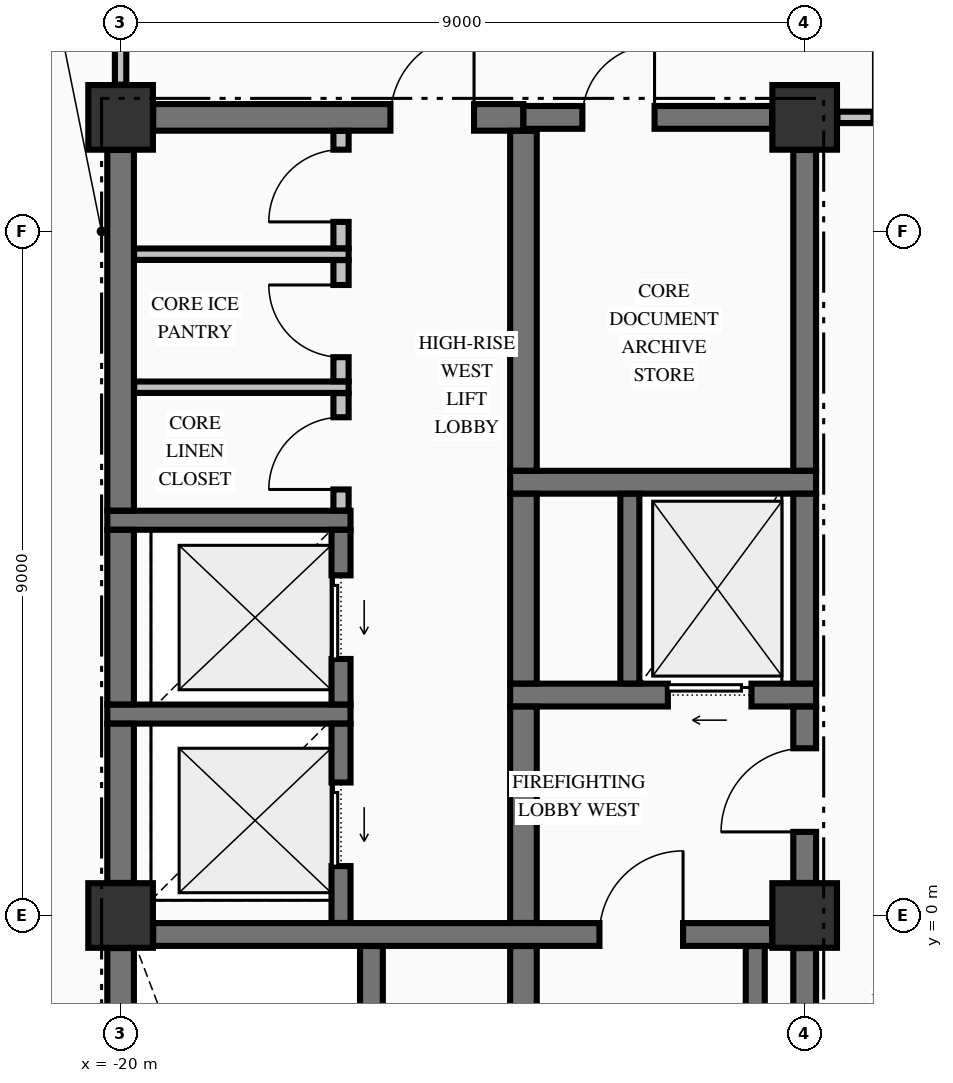
"""IFC4 building model, lengths in metres.
Left out: names, types, materials, properties, quantities, classifications, styles, units other than length and angle.
Written with IfcOpenShell. Run it as: python <this file> out.ifc"""

import sys

from ifc_helpers import new_model, si_unit, direction, frame, frame_2d, origin, origin_2d, place, context, subcontext, project, spatial, rectangle, extrude, element, fill, save


model = new_model("IFC4")
c1 = context("Model", 3, precision=1e-05, world=origin(), true_north=direction((0.0, 1.0)))
c2 = subcontext(c1, "Body", "Model", "MODEL_VIEW")
j1 = project(units=[si_unit("LENGTHUNIT", "METRE"), si_unit("PLANEANGLEUNIT", "RADIAN")], contexts=[c1])
p1 = place(None, origin())
s1 = spatial("IfcSite", under=j1, at=p1, CompositionType="ELEMENT")
p2 = place(p1, origin())
s2 = spatial("IfcBuilding", under=s1, at=p2, CompositionType="ELEMENT")
p3 = place(p2, frame((0.0, 0.0, 172.86)))
s3 = spatial("IfcBuildingStorey", under=s2, at=p3, CompositionType="ELEMENT", Elevation=172.86)
for number, where, z_axis, x_axis in (
    (1, (-20.0, 10.5, -0.25), (0.0, 0.0, 1.0), (1.0, 0.0, 0.0)),
    (2, (-11.0, 0.0, -0.25), (0.0, 0.0, 1.0), (1.0, 0.0, 0.0)),
    (3, (-11.0, 10.5, -0.25), (0.0, 0.0, 1.0), (1.0, 0.0, 0.0)),
    (4, (-20.0, 0.0, -0.25), (0.0, 0.0, 1.0), (1.0, 0.0, 0.0)),
):
    element("IfcColumn", number, at=place(p3, frame(where, z_axis=z_axis, x_axis=x_axis)), inside=s3, PredefinedType="COLUMN", context=c2, shape_type="SweptSolid", body=[
        extrude(rectangle(XDim=0.85, YDim=0.85, at=origin_2d()), origin(), (0.0, 0.0, 1.0), 3.375),
    ])
p4 = place(p3, frame((-19.571, -0.25, 0.0), z_axis=(0.0, 0.0, 1.0), x_axis=(1.0, 0.0, 0.0)))
e5 = element("IfcWall", 5, at=p4, inside=s3, PredefinedType="SHEAR", context=c2, shape_type="SweptSolid", body=[
    extrude(rectangle(XDim=8.142, YDim=0.3, at=frame_2d((4.071, 0.0))), origin(), (0.0, 0.0, 1.0), 3.125),
])
p5 = place(p4, frame((5.871, 0.0, 0.0)))
e6 = element("IfcOpeningElement", 6, at=p5, cuts=e5, PredefinedType="OPENING", context=c2, shape_type="SweptSolid", body=[
    extrude(rectangle(XDim=1.1, YDim=2.15, at=frame_2d((0.55, 1.075))), frame((0.0, 0.16, 0.0), z_axis=(0.0, -1.0, 0.0), x_axis=(1.0, 0.0, 0.0)), (0.0, 0.0, 1.0), 0.32),
])
p6 = place(p3, frame((-20.175, 2.65, 0.0), z_axis=(0.0, 0.0, 1.0), x_axis=(1.0, 0.0, 0.0)))
e7 = element("IfcWall", 7, at=p6, inside=s3, PredefinedType="SOLIDWALL", context=c2, shape_type="SweptSolid", body=[
    extrude(rectangle(XDim=3.2, YDim=0.25, at=frame_2d((1.6, 0.0))), origin(), (0.0, 0.0, 1.0), 3.125),
])
p7 = place(p3, frame((-14.875, 2.9, 0.0), z_axis=(0.0, 0.0, 1.0), x_axis=(1.0, 0.0, 0.0)))
e8 = element("IfcWall", 8, at=p7, inside=s3, PredefinedType="SHEAR", context=c2, shape_type="SweptSolid", body=[
    extrude(rectangle(XDim=4.025, YDim=0.3, at=frame_2d((2.012, 0.0))), origin(), (0.0, 0.0, 1.0), 3.125),
])
p8 = place(p7, frame((2.075, 0.0, 0.0)))
e9 = element("IfcOpeningElement", 9, at=p8, cuts=e8, PredefinedType="OPENING", context=c2, shape_type="SweptSolid", body=[
    extrude(rectangle(XDim=1.1, YDim=2.2, at=frame_2d((0.55, 1.1))), frame((0.0, 0.16, 0.0), z_axis=(0.0, -1.0, 0.0), x_axis=(1.0, 0.0, 0.0)), (0.0, 0.0, 1.0), 0.32),
])
p9 = place(p3, frame((-20.175, 5.2, 0.0), z_axis=(0.0, 0.0, 1.0), x_axis=(1.0, 0.0, 0.0)))
e10 = element("IfcWall", 10, at=p9, inside=s3, PredefinedType="SOLIDWALL", context=c2, shape_type="SweptSolid", body=[
    extrude(rectangle(XDim=3.2, YDim=0.25, at=frame_2d((1.6, 0.0))), origin(), (0.0, 0.0, 1.0), 3.125),
])
p10 = place(p3, frame((-14.875, 5.7, 0.0), z_axis=(0.0, 0.0, 1.0), x_axis=(1.0, 0.0, 0.0)))
e11 = element("IfcWall", 11, at=p10, inside=s3, PredefinedType="SHEAR", context=c2, shape_type="SweptSolid", body=[
    extrude(rectangle(XDim=4.025, YDim=0.3, at=frame_2d((2.012, 0.0))), origin(), (0.0, 0.0, 1.0), 3.125),
])
p11 = place(p3, frame((-19.571, 10.5, 0.0), z_axis=(0.0, 0.0, 1.0), x_axis=(1.0, 0.0, 0.0)))
e12 = element("IfcWall", 12, at=p11, inside=s3, PredefinedType="SHEAR", context=c2, shape_type="SweptSolid", body=[
    extrude(rectangle(XDim=4.871, YDim=0.35, at=frame_2d((2.436, 0.0))), origin(), (0.0, 0.0, 1.0), 3.125),
])
p12 = place(p11, frame((3.121, 0.0, 0.0)))
e13 = element("IfcOpeningElement", 13, at=p12, cuts=e12, PredefinedType="OPENING", context=c2, shape_type="SweptSolid", body=[
    extrude(rectangle(XDim=1.1, YDim=2.15, at=frame_2d((0.55, 1.075))), frame((0.0, 0.185, 0.0), z_axis=(0.0, -1.0, 0.0), x_axis=(1.0, 0.0, 0.0)), (0.0, 0.0, 1.0), 0.37),
])
p13 = place(p3, frame((-14.7, 10.5, 0.0), z_axis=(0.0, 0.0, 1.0), x_axis=(1.0, 0.0, 0.0)))
e14 = element("IfcWall", 14, at=p13, inside=s3, PredefinedType="SHEAR", context=c2, shape_type="SweptSolid", body=[
    extrude(rectangle(XDim=3.271, YDim=0.3, at=frame_2d((1.635, 0.0))), origin(), (0.0, 0.0, 1.0), 3.125),
])
p14 = place(p13, frame((0.775, 0.0, 0.0)))
e15 = element("IfcOpeningElement", 15, at=p14, cuts=e14, PredefinedType="OPENING", context=c2, shape_type="SweptSolid", body=[
    extrude(rectangle(XDim=0.95, YDim=2.15, at=frame_2d((0.475, 1.075))), frame((0.0, 0.16, 0.0), z_axis=(0.0, -1.0, 0.0), x_axis=(1.0, 0.0, 0.0)), (0.0, 0.0, 1.0), 0.32),
])
for number, where, z_axis, x_axis in (
    (16, (-19.822, 6.95, 0.0), (0.0, 0.0, 1.0), (1.0, 0.0, 0.0)),
    (17, (-19.822, 8.7, 0.0), (0.0, 0.0, 1.0), (1.0, 0.0, 0.0)),
):
    element("IfcWall", number, at=place(p3, frame(where, z_axis=z_axis, x_axis=x_axis)), inside=s3, PredefinedType="PARTITIONING", context=c2, shape_type="SweptSolid", body=[
        extrude(rectangle(XDim=2.822, YDim=0.15, at=frame_2d((1.411, 0.0))), origin(), (0.0, 0.0, 1.0), 3.125),
    ])
p15 = place(p3, frame((-10.569, 10.5, 0.0), z_axis=(0.0, 0.0, 1.0), x_axis=(1.0, 0.0, 0.0)))
e18 = element("IfcWall", 18, at=p15, inside=s3, PredefinedType="PARTITIONING", context=c2, shape_type="SweptSolid", body=[
    extrude(rectangle(XDim=21.138, YDim=0.15, at=frame_2d((10.569, 0.0))), origin(), (0.0, 0.0, 1.0), 3.125),
])
p16 = place(p15, frame((0.474, 0.0, 0.0)))
e19 = element("IfcOpeningElement", 19, at=p16, cuts=e18, PredefinedType="OPENING", context=c2, shape_type="SweptSolid", body=[
    extrude(rectangle(XDim=1.05, YDim=2.15, at=frame_2d((0.525, 1.075))), frame((0.0, 0.085, 0.0), z_axis=(0.0, -1.0, 0.0), x_axis=(1.0, 0.0, 0.0)), (0.0, 0.0, 1.0), 0.17),
])
p17 = place(p15, frame((19.614, 0.0, 0.0)))
e20 = element("IfcOpeningElement", 20, at=p17, cuts=e18, PredefinedType="OPENING", context=c2, shape_type="SweptSolid", body=[
    extrude(rectangle(XDim=1.05, YDim=2.15, at=frame_2d((0.525, 1.075))), frame((0.0, 0.085, 0.0), z_axis=(0.0, -1.0, 0.0), x_axis=(1.0, 0.0, 0.0)), (0.0, 0.0, 1.0), 0.17),
])
p18 = place(p3, frame((-20.0, -9.521, 0.0), z_axis=(0.0, 0.0, 1.0), x_axis=(0.0, 1.0, 0.0)))
e21 = element("IfcWall", 21, at=p18, inside=s3, PredefinedType="SHEAR", context=c2, shape_type="SweptSolid", body=[
    extrude(rectangle(XDim=9.092, YDim=0.35, at=frame_2d((4.546, 0.0))), origin(), (0.0, 0.0, 1.0), 3.125),
])
p19 = place(p3, frame((-20.0, 0.429, 0.0), z_axis=(0.0, 0.0, 1.0), x_axis=(0.0, 1.0, 0.0)))
e22 = element("IfcWall", 22, at=p19, inside=s3, PredefinedType="SHEAR", context=c2, shape_type="SweptSolid", body=[
    extrude(rectangle(XDim=2.094, YDim=0.35, at=frame_2d((1.047, 0.0))), origin(), (0.0, 0.0, 1.0), 3.125),
])
p20 = place(p3, frame((-20.0, 2.777, 0.0), z_axis=(0.0, 0.0, 1.0), x_axis=(0.0, 1.0, 0.0)))
e23 = element("IfcWall", 23, at=p20, inside=s3, PredefinedType="SHEAR", context=c2, shape_type="SweptSolid", body=[
    extrude(rectangle(XDim=2.296, YDim=0.35, at=frame_2d((1.148, 0.0))), origin(), (0.0, 0.0, 1.0), 3.125),
])
p21 = place(p3, frame((-20.0, 5.327, 0.0), z_axis=(0.0, 0.0, 1.0), x_axis=(0.0, 1.0, 0.0)))
e24 = element("IfcWall", 24, at=p21, inside=s3, PredefinedType="SHEAR", context=c2, shape_type="SweptSolid", body=[
    extrude(rectangle(XDim=4.744, YDim=0.35, at=frame_2d((2.372, 0.0))), origin(), (0.0, 0.0, 1.0), 3.125),
])
p22 = place(p3, frame((-17.1, -0.098, 0.0), z_axis=(0.0, 0.0, 1.0), x_axis=(0.0, 1.0, 0.0)))
e25 = element("IfcWall", 25, at=p22, inside=s3, PredefinedType="SOLIDWALL", context=c2, shape_type="SweptSolid", body=[
    extrude(rectangle(XDim=2.621, YDim=0.25, at=frame_2d((1.311, 0.0))), origin(), (0.0, 0.0, 1.0), 3.125),
])
p23 = place(p22, frame((0.748, 0.0, 0.0)))
e26 = element("IfcOpeningElement", 26, at=p23, cuts=e25, PredefinedType="OPENING", context=c2, shape_type="SweptSolid", body=[
    extrude(rectangle(XDim=1.1, YDim=2.2, at=frame_2d((0.55, 1.1))), frame((0.0, 0.135, 0.0), z_axis=(0.0, -1.0, 0.0), x_axis=(1.0, 0.0, 0.0)), (0.0, 0.0, 1.0), 0.27),
])
p24 = place(p3, frame((-17.1, 2.777, 0.0), z_axis=(0.0, 0.0, 1.0), x_axis=(0.0, 1.0, 0.0)))
e27 = element("IfcWall", 27, at=p24, inside=s3, PredefinedType="SOLIDWALL", context=c2, shape_type="SweptSolid", body=[
    extrude(rectangle(XDim=2.296, YDim=0.25, at=frame_2d((1.148, 0.0))), origin(), (0.0, 0.0, 1.0), 3.125),
])
p25 = place(p24, frame((0.598, 0.0, 0.0)))
e28 = element("IfcOpeningElement", 28, at=p25, cuts=e27, PredefinedType="OPENING", context=c2, shape_type="SweptSolid", body=[
    extrude(rectangle(XDim=1.1, YDim=2.2, at=frame_2d((0.55, 1.1))), frame((0.0, 0.135, 0.0), z_axis=(0.0, -1.0, 0.0), x_axis=(1.0, 0.0, 0.0)), (0.0, 0.0, 1.0), 0.27),
])
p26 = place(p3, frame((-16.7, -9.773, 0.0), z_axis=(0.0, 0.0, 1.0), x_axis=(0.0, 1.0, 0.0)))
e29 = element("IfcWall", 29, at=p26, inside=s3, PredefinedType="SHEAR", context=c2, shape_type="SweptSolid", body=[
    extrude(rectangle(XDim=9.371, YDim=0.3, at=frame_2d((4.686, 0.0))), origin(), (0.0, 0.0, 1.0), 3.125),
])
p27 = place(p3, frame((-14.7, -9.773, 0.0), z_axis=(0.0, 0.0, 1.0), x_axis=(0.0, 1.0, 0.0)))
e30 = element("IfcWall", 30, at=p27, inside=s3, PredefinedType="SHEAR", context=c2, shape_type="SweptSolid", body=[
    extrude(rectangle(XDim=9.371, YDim=0.35, at=frame_2d((4.686, 0.0))), origin(), (0.0, 0.0, 1.0), 3.125),
])
p28 = place(p3, frame((-14.7, -0.098, 0.0), z_axis=(0.0, 0.0, 1.0), x_axis=(0.0, 1.0, 0.0)))
e31 = element("IfcWall", 31, at=p28, inside=s3, PredefinedType="SHEAR", context=c2, shape_type="SweptSolid", body=[
    extrude(rectangle(XDim=2.846, YDim=0.35, at=frame_2d((1.423, 0.0))), origin(), (0.0, 0.0, 1.0), 3.125),
])
p29 = place(p3, frame((-14.7, 3.052, 0.0), z_axis=(0.0, 0.0, 1.0), x_axis=(0.0, 1.0, 0.0)))
e32 = element("IfcWall", 32, at=p29, inside=s3, PredefinedType="SHEAR", context=c2, shape_type="SweptSolid", body=[
    extrude(rectangle(XDim=2.496, YDim=0.35, at=frame_2d((1.248, 0.0))), origin(), (0.0, 0.0, 1.0), 3.125),
])
p30 = place(p3, frame((-14.7, 5.852, 0.0), z_axis=(0.0, 0.0, 1.0), x_axis=(0.0, 1.0, 0.0)))
e33 = element("IfcWall", 33, at=p30, inside=s3, PredefinedType="SHEAR", context=c2, shape_type="SweptSolid", body=[
    extrude(rectangle(XDim=4.471, YDim=0.35, at=frame_2d((2.235, 0.0))), origin(), (0.0, 0.0, 1.0), 3.125),
])
p31 = place(p3, frame((-13.3, 3.052, 0.0), z_axis=(0.0, 0.0, 1.0), x_axis=(0.0, 1.0, 0.0)))
e34 = element("IfcWall", 34, at=p31, inside=s3, PredefinedType="SOLIDWALL", context=c2, shape_type="SweptSolid", body=[
    extrude(rectangle(XDim=2.496, YDim=0.25, at=frame_2d((1.248, 0.0))), origin(), (0.0, 0.0, 1.0), 3.125),
])
p32 = place(p3, frame((-11.65, -9.798, 0.0), z_axis=(0.0, 0.0, 1.0), x_axis=(0.0, 1.0, 0.0)))
e35 = element("IfcWall", 35, at=p32, inside=s3, PredefinedType="SOLIDWALL", context=c2, shape_type="SweptSolid", body=[
    extrude(rectangle(XDim=9.396, YDim=0.25, at=frame_2d((4.698, 0.0))), origin(), (0.0, 0.0, 1.0), 3.125),
])
p33 = place(p3, frame((-11.0, -9.521, 0.0), z_axis=(0.0, 0.0, 1.0), x_axis=(0.0, 1.0, 0.0)))
e36 = element("IfcWall", 36, at=p33, inside=s3, PredefinedType="SHEAR", context=c2, shape_type="SweptSolid", body=[
    extrude(rectangle(XDim=9.092, YDim=0.3, at=frame_2d((4.546, 0.0))), origin(), (0.0, 0.0, 1.0), 3.125),
])
p34 = place(p3, frame((-11.0, 0.429, 0.0), z_axis=(0.0, 0.0, 1.0), x_axis=(0.0, 1.0, 0.0)))
e37 = element("IfcWall", 37, at=p34, inside=s3, PredefinedType="SHEAR", context=c2, shape_type="SweptSolid", body=[
    extrude(rectangle(XDim=2.319, YDim=0.3, at=frame_2d((1.16, 0.0))), origin(), (0.0, 0.0, 1.0), 3.125),
])
p35 = place(p34, frame((0.671, 0.0, 0.0)))
e38 = element("IfcOpeningElement", 38, at=p35, cuts=e37, PredefinedType="OPENING", context=c2, shape_type="SweptSolid", body=[
    extrude(rectangle(XDim=1.1, YDim=2.15, at=frame_2d((0.55, 1.075))), frame((0.0, 0.16, 0.0), z_axis=(0.0, -1.0, 0.0), x_axis=(1.0, 0.0, 0.0)), (0.0, 0.0, 1.0), 0.32),
])
p36 = place(p3, frame((-11.0, 3.052, 0.0), z_axis=(0.0, 0.0, 1.0), x_axis=(0.0, 1.0, 0.0)))
e39 = element("IfcWall", 39, at=p36, inside=s3, PredefinedType="SHEAR", context=c2, shape_type="SweptSolid", body=[
    extrude(rectangle(XDim=2.496, YDim=0.3, at=frame_2d((1.248, 0.0))), origin(), (0.0, 0.0, 1.0), 3.125),
])
p37 = place(p3, frame((-11.0, 5.852, 0.0), z_axis=(0.0, 0.0, 1.0), x_axis=(0.0, 1.0, 0.0)))
e40 = element("IfcWall", 40, at=p37, inside=s3, PredefinedType="SHEAR", context=c2, shape_type="SweptSolid", body=[
    extrude(rectangle(XDim=4.219, YDim=0.3, at=frame_2d((2.109, 0.0))), origin(), (0.0, 0.0, 1.0), 3.125),
])
p38 = place(p3, frame((-20.0, 10.931, 0.0), z_axis=(0.0, 0.0, 1.0), x_axis=(0.0, 1.0, 0.0)))
e41 = element("IfcWall", 41, at=p38, inside=s3, PredefinedType="PARTITIONING", context=c2, shape_type="SweptSolid", body=[
    extrude(rectangle(XDim=2.541, YDim=0.15, at=frame_2d((1.271, 0.0))), origin(), (0.0, 0.0, 1.0), 2.317),
])
p39 = place(p3, frame((-17.1, 5.328, 0.0), z_axis=(0.0, 0.0, 1.0), x_axis=(0.0, 1.0, 0.0)))
e42 = element("IfcWall", 42, at=p39, inside=s3, PredefinedType="PARTITIONING", context=c2, shape_type="SweptSolid", body=[
    extrude(rectangle(XDim=1.544, YDim=0.2, at=frame_2d((0.772, 0.0))), origin(), (0.0, 0.0, 1.0), 3.125),
])
p40 = place(p39, frame((0.277, 0.0, 0.0)))
e43 = element("IfcOpeningElement", 43, at=p40, cuts=e42, PredefinedType="OPENING", context=c2, shape_type="SweptSolid", body=[
    extrude(rectangle(XDim=0.95, YDim=2.15, at=frame_2d((0.475, 1.075))), frame((0.0, 0.11, 0.0), z_axis=(0.0, -1.0, 0.0), x_axis=(1.0, 0.0, 0.0)), (0.0, 0.0, 1.0), 0.22),
])
p41 = place(p3, frame((-17.1, 7.028, 0.0), z_axis=(0.0, 0.0, 1.0), x_axis=(0.0, 1.0, 0.0)))
e44 = element("IfcWall", 44, at=p41, inside=s3, PredefinedType="PARTITIONING", context=c2, shape_type="SweptSolid", body=[
    extrude(rectangle(XDim=1.594, YDim=0.2, at=frame_2d((0.797, 0.0))), origin(), (0.0, 0.0, 1.0), 3.125),
])
p42 = place(p41, frame((0.317, 0.0, 0.0)))
e45 = element("IfcOpeningElement", 45, at=p42, cuts=e44, PredefinedType="OPENING", context=c2, shape_type="SweptSolid", body=[
    extrude(rectangle(XDim=0.95, YDim=2.15, at=frame_2d((0.475, 1.075))), frame((0.0, 0.11, 0.0), z_axis=(0.0, -1.0, 0.0), x_axis=(1.0, 0.0, 0.0)), (0.0, 0.0, 1.0), 0.22),
])
p43 = place(p3, frame((-17.1, 8.778, 0.0), z_axis=(0.0, 0.0, 1.0), x_axis=(0.0, 1.0, 0.0)))
e46 = element("IfcWall", 46, at=p43, inside=s3, PredefinedType="PARTITIONING", context=c2, shape_type="SweptSolid", body=[
    extrude(rectangle(XDim=1.544, YDim=0.2, at=frame_2d((0.772, 0.0))), origin(), (0.0, 0.0, 1.0), 3.125),
])
p44 = place(p43, frame((0.347, 0.0, 0.0)))
e47 = element("IfcOpeningElement", 47, at=p44, cuts=e46, PredefinedType="OPENING", context=c2, shape_type="SweptSolid", body=[
    extrude(rectangle(XDim=0.95, YDim=2.15, at=frame_2d((0.475, 1.075))), frame((0.0, 0.11, 0.0), z_axis=(0.0, -1.0, 0.0), x_axis=(1.0, 0.0, 0.0)), (0.0, 0.0, 1.0), 0.22),
])
p45 = place(p5, origin())
e48 = element("IfcDoor", 48, at=p45, inside=s3, OperationType="SINGLE_SWING_RIGHT", PredefinedType="DOOR", context=c2, shape_type="SweptSolid", body=[
    extrude(rectangle(XDim=1.1, YDim=2.15, at=frame_2d((0.55, 1.075))), frame((0.0, 0.025, 0.0), z_axis=(0.0, -1.0, 0.0), x_axis=(1.0, 0.0, 0.0)), (0.0, 0.0, 1.0), 0.05),
])
fill(e6, e48)
p46 = place(p35, origin())
e49 = element("IfcDoor", 49, at=p46, inside=s3, OperationType="SINGLE_SWING_LEFT", PredefinedType="DOOR", context=c2, shape_type="SweptSolid", body=[
    extrude(rectangle(XDim=1.1, YDim=2.15, at=frame_2d((0.55, 1.075))), frame((0.0, 0.025, 0.0), z_axis=(0.0, -1.0, 0.0), x_axis=(1.0, 0.0, 0.0)), (0.0, 0.0, 1.0), 0.05),
])
fill(e38, e49)
p47 = place(p8, origin())
e50 = element("IfcDoor", 50, at=p47, inside=s3, OperationType="SLIDING_TO_LEFT", PredefinedType="DOOR", context=c2, shape_type="SweptSolid", body=[
    extrude(rectangle(XDim=1.1, YDim=2.2, at=frame_2d((0.55, 1.1))), frame((0.0, 0.025, 0.0), z_axis=(0.0, -1.0, 0.0), x_axis=(1.0, 0.0, 0.0)), (0.0, 0.0, 1.0), 0.05),
])
fill(e9, e50)
p48 = place(p14, origin())
e51 = element("IfcDoor", 51, at=p48, inside=s3, OperationType="SINGLE_SWING_RIGHT", PredefinedType="DOOR", context=c2, shape_type="SweptSolid", body=[
    extrude(rectangle(XDim=0.95, YDim=2.15, at=frame_2d((0.475, 1.075))), frame((0.0, 0.025, 0.0), z_axis=(0.0, -1.0, 0.0), x_axis=(1.0, 0.0, 0.0)), (0.0, 0.0, 1.0), 0.05),
])
fill(e15, e51)
p49 = place(p23, origin())
e52 = element("IfcDoor", 52, at=p49, inside=s3, OperationType="SLIDING_TO_LEFT", PredefinedType="DOOR", context=c2, shape_type="SweptSolid", body=[
    extrude(rectangle(XDim=1.1, YDim=2.2, at=frame_2d((0.55, 1.1))), frame((0.0, 0.025, 0.0), z_axis=(0.0, -1.0, 0.0), x_axis=(1.0, 0.0, 0.0)), (0.0, 0.0, 1.0), 0.05),
])
fill(e26, e52)
p50 = place(p25, origin())
e53 = element("IfcDoor", 53, at=p50, inside=s3, OperationType="SLIDING_TO_LEFT", PredefinedType="DOOR", context=c2, shape_type="SweptSolid", body=[
    extrude(rectangle(XDim=1.1, YDim=2.2, at=frame_2d((0.55, 1.1))), frame((0.0, 0.025, 0.0), z_axis=(0.0, -1.0, 0.0), x_axis=(1.0, 0.0, 0.0)), (0.0, 0.0, 1.0), 0.05),
])
fill(e28, e53)
p51 = place(p12, origin())
e54 = element("IfcDoor", 54, at=p51, inside=s3, OperationType="SINGLE_SWING_RIGHT", PredefinedType="DOOR", context=c2, shape_type="SweptSolid", body=[
    extrude(rectangle(XDim=1.1, YDim=2.15, at=frame_2d((0.55, 1.075))), frame((0.0, 0.025, 0.0), z_axis=(0.0, -1.0, 0.0), x_axis=(1.0, 0.0, 0.0)), (0.0, 0.0, 1.0), 0.05),
])
fill(e13, e54)
p52 = place(p44, origin())
e55 = element("IfcDoor", 55, at=p52, inside=s3, OperationType="SINGLE_SWING_LEFT", PredefinedType="DOOR", context=c2, shape_type="SweptSolid", body=[
    extrude(rectangle(XDim=0.95, YDim=2.15, at=frame_2d((0.475, 1.075))), frame((0.0, 0.025, 0.0), z_axis=(0.0, -1.0, 0.0), x_axis=(1.0, 0.0, 0.0)), (0.0, 0.0, 1.0), 0.05),
])
fill(e47, e55)
p53 = place(p42, origin())
e56 = element("IfcDoor", 56, at=p53, inside=s3, OperationType="SINGLE_SWING_RIGHT", PredefinedType="DOOR", context=c2, shape_type="SweptSolid", body=[
    extrude(rectangle(XDim=0.95, YDim=2.15, at=frame_2d((0.475, 1.075))), frame((0.0, 0.025, 0.0), z_axis=(0.0, -1.0, 0.0), x_axis=(1.0, 0.0, 0.0)), (0.0, 0.0, 1.0), 0.05),
])
fill(e45, e56)
p54 = place(p40, origin())
e57 = element("IfcDoor", 57, at=p54, inside=s3, OperationType="SINGLE_SWING_LEFT", PredefinedType="DOOR", context=c2, shape_type="SweptSolid", body=[
    extrude(rectangle(XDim=0.95, YDim=2.15, at=frame_2d((0.475, 1.075))), frame((0.0, 0.025, 0.0), z_axis=(0.0, -1.0, 0.0), x_axis=(1.0, 0.0, 0.0)), (0.0, 0.0, 1.0), 0.05),
])
fill(e43, e57)
save(model, sys.argv[1])
